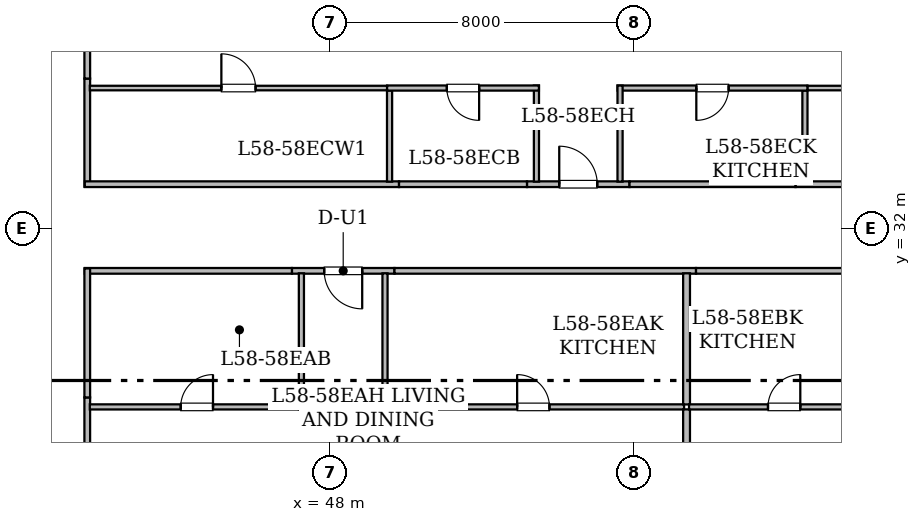
"""IFC4 building model, lengths in metres.
Left out: names, types, materials, properties, quantities, classifications, styles, units other than length and angle.
Written with IfcOpenShell. Run it as: python <this file> out.ifc"""

import sys

from ifc_helpers import new_model, si_unit, direction, frame, frame_2d, origin, place, context, subcontext, project, spatial, rectangle, extrude, element, fill, save


model = new_model("IFC4")
c1 = context("Model", 3, precision=1e-05, world=origin(), true_north=direction((0.0, 1.0)))
c2 = subcontext(c1, "Body", "Model", "MODEL_VIEW")
j1 = project(units=[si_unit("LENGTHUNIT", "METRE"), si_unit("PLANEANGLEUNIT", "RADIAN")], contexts=[c1])
p1 = place(None, origin())
s1 = spatial("IfcSite", under=j1, at=p1, CompositionType="ELEMENT")
p2 = place(p1, origin())
s2 = spatial("IfcBuilding", under=s1, at=p2, CompositionType="ELEMENT")
p3 = place(p2, frame((0.0, 0.0, 228.15)))
s3 = spatial("IfcBuildingStorey", under=s2, at=p3, CompositionType="ELEMENT", Elevation=228.15)
p4 = place(p3, frame((49.699, 30.885, 0.0), z_axis=(0.0, 0.0, 1.0), x_axis=(-1.0, 0.0, 0.0)))
e1 = element("IfcWall", 1, at=p4, inside=s3, PredefinedType="STANDARD", context=c2, shape_type="SweptSolid", body=[
    extrude(rectangle(XDim=2.698, YDim=0.15, at=frame_2d((1.349, 0.0))), origin(), (0.0, 0.0, 1.0), 3.43),
])
p5 = place(p4, frame((0.849, 0.0, 0.0)))
e2 = element("IfcOpeningElement", 2, at=p5, cuts=e1, PredefinedType="OPENING", context=c2, shape_type="SweptSolid", body=[
    extrude(rectangle(XDim=1.0, YDim=2.15, at=frame_2d((0.5, 1.075))), frame((0.0, 0.085, 0.0), z_axis=(0.0, -1.0, 0.0), x_axis=(1.0, 0.0, 0.0)), (0.0, 0.0, 1.0), 0.17),
])
p6 = place(p3, frame((41.615, 27.554, 0.0), z_axis=(0.0, 0.0, 1.0), x_axis=(0.0, -1.0, 0.0)))
e3 = element("IfcWall", 3, at=p6, inside=s3, PredefinedType="STANDARD", context=c2, shape_type="SweptSolid", body=[
    extrude(rectangle(XDim=2.078, YDim=0.15, at=frame_2d((1.039, 0.0))), origin(), (0.0, 0.0, 1.0), 3.43),
])
p7 = place(p3, frame((47.001, 30.885, 0.0), z_axis=(0.0, 0.0, 1.0), x_axis=(-1.0, 0.0, 0.0)))
e4 = element("IfcWall", 4, at=p7, inside=s3, PredefinedType="STANDARD", context=c2, shape_type="SweptSolid", body=[
    extrude(rectangle(XDim=5.451, YDim=0.15, at=frame_2d((2.726, 0.0))), origin(), (0.0, 0.0, 1.0), 3.43),
])
p8 = place(p3, frame((41.615, 30.948, 0.0), z_axis=(0.0, 0.0, 1.0), x_axis=(0.0, -1.0, 0.0)))
e5 = element("IfcWall", 5, at=p8, inside=s3, PredefinedType="STANDARD", context=c2, shape_type="SweptSolid", body=[
    extrude(rectangle(XDim=3.394, YDim=0.15, at=frame_2d((1.697, 0.0))), origin(), (0.0, 0.0, 1.0), 3.43),
])
p9 = place(p3, frame((57.634, 30.885, 0.0), z_axis=(0.0, 0.0, 1.0), x_axis=(-1.0, 0.0, 0.0)))
e6 = element("IfcWall", 6, at=p9, inside=s3, PredefinedType="STANDARD", context=c2, shape_type="SweptSolid", body=[
    extrude(rectangle(XDim=7.935, YDim=0.15, at=frame_2d((3.968, 0.0))), origin(), (0.0, 0.0, 1.0), 2.725),
])
p10 = place(p3, frame((62.142, 30.885, 0.0), z_axis=(0.0, 0.0, 1.0), x_axis=(-1.0, 0.0, 0.0)))
e7 = element("IfcWall", 7, at=p10, inside=s3, PredefinedType="STANDARD", context=c2, shape_type="SweptSolid", body=[
    extrude(rectangle(XDim=4.508, YDim=0.15, at=frame_2d((2.254, 0.0))), origin(), (0.0, 0.0, 1.0), 3.43),
])
p11 = place(p3, frame((41.615, 35.944, 0.0), z_axis=(0.0, 0.0, 1.0), x_axis=(0.0, -1.0, 0.0)))
e8 = element("IfcWall", 8, at=p11, inside=s3, PredefinedType="STANDARD", context=c2, shape_type="SweptSolid", body=[
    extrude(rectangle(XDim=2.844, YDim=0.15, at=frame_2d((1.422, 0.0))), origin(), (0.0, 0.0, 1.0), 3.065),
])
p12 = place(p3, frame((41.55, 33.165, 0.0), z_axis=(0.0, 0.0, 1.0), x_axis=(1.0, 0.0, 0.0)))
e9 = element("IfcWall", 9, at=p12, inside=s3, PredefinedType="STANDARD", context=c2, shape_type="SweptSolid", body=[
    extrude(rectangle(XDim=8.269, YDim=0.15, at=frame_2d((4.135, 0.0))), origin(), (0.0, 0.0, 1.0), 3.065),
])
p13 = place(p3, frame((60.251, 33.165, 0.0), z_axis=(0.0, 0.0, 1.0), x_axis=(1.0, 0.0, 0.0)))
e10 = element("IfcWall", 10, at=p13, inside=s3, PredefinedType="STANDARD", context=c2, shape_type="SweptSolid", body=[
    extrude(rectangle(XDim=9.357, YDim=0.15, at=frame_2d((4.678, 0.0))), origin(), (0.0, 0.0, 1.0), 2.887),
])
p14 = place(p3, frame((41.615, 37.524, 0.0), z_axis=(0.0, 0.0, 1.0), x_axis=(0.0, -1.0, 0.0)))
e11 = element("IfcWall", 11, at=p14, inside=s3, PredefinedType="STANDARD", context=c2, shape_type="SweptSolid", body=[
    extrude(rectangle(XDim=1.58, YDim=0.15, at=frame_2d((0.79, 0.0))), origin(), (0.0, 0.0, 1.0), 2.725),
])
p15 = place(p3, frame((53.186, 33.165, 0.0), z_axis=(0.0, 0.0, 1.0), x_axis=(1.0, 0.0, 0.0)))
e12 = element("IfcWall", 12, at=p15, inside=s3, PredefinedType="STANDARD", context=c2, shape_type="SweptSolid", body=[
    extrude(rectangle(XDim=2.698, YDim=0.15, at=frame_2d((1.349, 0.0))), origin(), (0.0, 0.0, 1.0), 2.725),
])
p16 = place(p15, frame((0.849, 0.0, 0.0)))
e13 = element("IfcOpeningElement", 13, at=p16, cuts=e12, PredefinedType="OPENING", context=c2, shape_type="SweptSolid", body=[
    extrude(rectangle(XDim=1.0, YDim=2.15, at=frame_2d((0.5, 1.075))), frame((0.0, 0.085, 0.0), z_axis=(0.0, -1.0, 0.0), x_axis=(1.0, 0.0, 0.0)), (0.0, 0.0, 1.0), 0.17),
])
p17 = place(p3, frame((49.819, 33.165, 0.0), z_axis=(0.0, 0.0, 1.0), x_axis=(1.0, 0.0, 0.0)))
e14 = element("IfcWall", 14, at=p17, inside=s3, PredefinedType="STANDARD", context=c2, shape_type="SweptSolid", body=[
    extrude(rectangle(XDim=3.367, YDim=0.15, at=frame_2d((1.684, 0.0))), origin(), (0.0, 0.0, 1.0), 2.725),
])
p18 = place(p3, frame((55.884, 33.165, 0.0), z_axis=(0.0, 0.0, 1.0), x_axis=(1.0, 0.0, 0.0)))
e15 = element("IfcWall", 15, at=p18, inside=s3, PredefinedType="STANDARD", context=c2, shape_type="SweptSolid", body=[
    extrude(rectangle(XDim=4.367, YDim=0.15, at=frame_2d((2.184, 0.0))), origin(), (0.0, 0.0, 1.0), 3.065),
])
p19 = place(p3, frame((41.682, 27.305, 0.0), z_axis=(0.0, 0.0, 1.0), x_axis=(1.0, 0.0, 0.0)))
e16 = element("IfcWall", 16, at=p19, inside=s3, PredefinedType="PARTITIONING", context=c2, shape_type="SweptSolid", body=[
    extrude(rectangle(XDim=5.633, YDim=0.135, at=frame_2d((2.816, 0.0))), origin(), (0.0, 0.0, 1.0), 3.43),
])
p20 = place(p19, frame((2.392, 0.0, 0.0)))
e17 = element("IfcOpeningElement", 17, at=p20, cuts=e16, PredefinedType="OPENING", context=c2, shape_type="SweptSolid", body=[
    extrude(rectangle(XDim=0.85, YDim=2.1, at=frame_2d((0.425, 1.05))), frame((0.0, 0.077, 0.0), z_axis=(0.0, -1.0, 0.0), x_axis=(1.0, 0.0, 0.0)), (0.0, 0.0, 1.0), 0.155),
])
for number, where, z_axis, x_axis in (
    (18, (47.25, 27.24, 0.0), (0.0, 0.0, 1.0), (0.0, 1.0, 0.0)),
    (19, (49.45, 30.82, 0.0), (0.0, 0.0, 1.0), (0.0, -1.0, 0.0)),
):
    element("IfcWall", number, at=place(p3, frame(where, z_axis=z_axis, x_axis=x_axis)), inside=s3, PredefinedType="PARTITIONING", context=c2, shape_type="SweptSolid", body=[
        extrude(rectangle(XDim=3.58, YDim=0.135, at=frame_2d((1.79, 0.0))), origin(), (0.0, 0.0, 1.0), 3.43),
    ])
p21 = place(p3, frame((49.385, 27.305, 0.0), z_axis=(0.0, 0.0, 1.0), x_axis=(1.0, 0.0, 0.0)))
e20 = element("IfcWall", 20, at=p21, inside=s3, PredefinedType="PARTITIONING", context=c2, shape_type="SweptSolid", body=[
    extrude(rectangle(XDim=7.935, YDim=0.135, at=frame_2d((3.968, 0.0))), origin(), (0.0, 0.0, 1.0), 2.725),
])
p22 = place(p21, frame((3.542, 0.0, 0.0)))
e21 = element("IfcOpeningElement", 21, at=p22, cuts=e20, PredefinedType="OPENING", context=c2, shape_type="SweptSolid", body=[
    extrude(rectangle(XDim=0.85, YDim=2.1, at=frame_2d((0.425, 1.05))), frame((0.0, 0.077, 0.0), z_axis=(0.0, -1.0, 0.0), x_axis=(1.0, 0.0, 0.0)), (0.0, 0.0, 1.0), 0.155),
])
p23 = place(p3, frame((57.385, 27.24, 0.0), z_axis=(0.0, 0.0, 1.0), x_axis=(0.0, -1.0, 0.0)))
e22 = element("IfcWall", 22, at=p23, inside=s3, PredefinedType="STANDARD", context=c2, shape_type="SweptSolid", body=[
    extrude(rectangle(XDim=1.45, YDim=0.18, at=frame_2d((0.725, 0.0))), origin(), (0.0, 0.0, 1.0), 3.43),
])
p24 = place(p3, frame((57.385, 30.82, 0.0), z_axis=(0.0, 0.0, 1.0), x_axis=(0.0, -1.0, 0.0)))
e23 = element("IfcWall", 23, at=p24, inside=s3, PredefinedType="STANDARD", context=c2, shape_type="SweptSolid", body=[
    extrude(rectangle(XDim=3.45, YDim=0.18, at=frame_2d((1.725, 0.0))), origin(), (0.0, 0.0, 1.0), 3.43),
])
p25 = place(p3, frame((57.45, 27.305, 0.0), z_axis=(0.0, 0.0, 1.0), x_axis=(1.0, 0.0, 0.0)))
e24 = element("IfcWall", 24, at=p25, inside=s3, PredefinedType="PARTITIONING", context=c2, shape_type="SweptSolid", body=[
    extrude(rectangle(XDim=5.006, YDim=0.135, at=frame_2d((2.503, 0.0))), origin(), (0.0, 0.0, 1.0), 3.43),
])
p26 = place(p25, frame((2.078, 0.0, 0.0)))
e25 = element("IfcOpeningElement", 25, at=p26, cuts=e24, PredefinedType="OPENING", context=c2, shape_type="SweptSolid", body=[
    extrude(rectangle(XDim=0.85, YDim=2.1, at=frame_2d((0.425, 1.05))), frame((0.0, 0.077, 0.0), z_axis=(0.0, -1.0, 0.0), x_axis=(1.0, 0.0, 0.0)), (0.0, 0.0, 1.0), 0.155),
])
p27 = place(p3, frame((41.682, 35.695, 0.0), z_axis=(0.0, 0.0, 1.0), x_axis=(1.0, 0.0, 0.0)))
e26 = element("IfcWall", 26, at=p27, inside=s3, PredefinedType="PARTITIONING", context=c2, shape_type="SweptSolid", body=[
    extrude(rectangle(XDim=7.823, YDim=0.12, at=frame_2d((3.912, 0.0))), origin(), (0.0, 0.0, 1.0), 3.43),
])
p28 = place(p27, frame((3.462, 0.0, 0.0)))
e27 = element("IfcOpeningElement", 27, at=p28, cuts=e26, PredefinedType="OPENING", context=c2, shape_type="SweptSolid", body=[
    extrude(rectangle(XDim=0.9, YDim=2.1, at=frame_2d((0.45, 1.05))), frame((0.0, 0.07, 0.0), z_axis=(0.0, -1.0, 0.0), x_axis=(1.0, 0.0, 0.0)), (0.0, 0.0, 1.0), 0.14),
])
p29 = place(p3, frame((49.57, 35.63, 0.0), z_axis=(0.0, 0.0, 1.0), x_axis=(0.0, -1.0, 0.0)))
e28 = element("IfcWall", 28, at=p29, inside=s3, PredefinedType="PARTITIONING", context=c2, shape_type="SweptSolid", body=[
    extrude(rectangle(XDim=2.398, YDim=0.135, at=frame_2d((1.199, 0.0))), origin(), (0.0, 0.0, 1.0), 3.065),
])
p30 = place(p3, frame((60.565, 35.695, 0.0), z_axis=(0.0, 0.0, 1.0), x_axis=(1.0, 0.0, 0.0)))
e29 = element("IfcWall", 29, at=p30, inside=s3, PredefinedType="PARTITIONING", context=c2, shape_type="SweptSolid", body=[
    extrude(rectangle(XDim=9.043, YDim=0.12, at=frame_2d((4.521, 0.0))), origin(), (0.0, 0.0, 1.0), 2.725),
])
p31 = place(p30, frame((4.071, 0.0, 0.0)))
e30 = element("IfcOpeningElement", 30, at=p31, cuts=e29, PredefinedType="OPENING", context=c2, shape_type="SweptSolid", body=[
    extrude(rectangle(XDim=0.9, YDim=2.1, at=frame_2d((0.45, 1.05))), frame((0.0, 0.07, 0.0), z_axis=(0.0, -1.0, 0.0), x_axis=(1.0, 0.0, 0.0)), (0.0, 0.0, 1.0), 0.14),
])
p32 = place(p3, frame((60.5, 33.232, 0.0), z_axis=(0.0, 0.0, 1.0), x_axis=(0.0, 1.0, 0.0)))
e31 = element("IfcWall", 31, at=p32, inside=s3, PredefinedType="PARTITIONING", context=c2, shape_type="SweptSolid", body=[
    extrude(rectangle(XDim=2.398, YDim=0.135, at=frame_2d((1.199, 0.0))), origin(), (0.0, 0.0, 1.0), 3.065),
])
p33 = place(p3, frame((53.435, 33.232, 0.0), z_axis=(0.0, 0.0, 1.0), x_axis=(0.0, 1.0, 0.0)))
e32 = element("IfcWall", 32, at=p33, inside=s3, PredefinedType="PARTITIONING", context=c2, shape_type="SweptSolid", body=[
    extrude(rectangle(XDim=2.528, YDim=0.135, at=frame_2d((1.264, 0.0))), origin(), (0.0, 0.0, 1.0), 2.725),
])
p34 = place(p3, frame((53.5, 35.695, 0.0), z_axis=(0.0, 0.0, 1.0), x_axis=(-1.0, 0.0, 0.0)))
e33 = element("IfcWall", 33, at=p34, inside=s3, PredefinedType="PARTITIONING", context=c2, shape_type="SweptSolid", body=[
    extrude(rectangle(XDim=3.995, YDim=0.135, at=frame_2d((1.998, 0.0))), origin(), (0.0, 0.0, 1.0), 2.725),
])
p35 = place(p34, frame((1.573, 0.0, 0.0)))
e34 = element("IfcOpeningElement", 34, at=p35, cuts=e33, PredefinedType="OPENING", context=c2, shape_type="SweptSolid", body=[
    extrude(rectangle(XDim=0.85, YDim=2.1, at=frame_2d((0.425, 1.05))), frame((0.0, 0.077, 0.0), z_axis=(0.0, -1.0, 0.0), x_axis=(1.0, 0.0, 0.0)), (0.0, 0.0, 1.0), 0.155),
])
p36 = place(p3, frame((60.565, 35.695, 0.0), z_axis=(0.0, 0.0, 1.0), x_axis=(-1.0, 0.0, 0.0)))
e35 = element("IfcWall", 35, at=p36, inside=s3, PredefinedType="PARTITIONING", context=c2, shape_type="SweptSolid", body=[
    extrude(rectangle(XDim=4.995, YDim=0.135, at=frame_2d((2.498, 0.0))), origin(), (0.0, 0.0, 1.0), 3.43),
])
p37 = place(p36, frame((2.073, 0.0, 0.0)))
e36 = element("IfcOpeningElement", 36, at=p37, cuts=e35, PredefinedType="OPENING", context=c2, shape_type="SweptSolid", body=[
    extrude(rectangle(XDim=0.85, YDim=2.1, at=frame_2d((0.425, 1.05))), frame((0.0, 0.077, 0.0), z_axis=(0.0, -1.0, 0.0), x_axis=(1.0, 0.0, 0.0)), (0.0, 0.0, 1.0), 0.155),
])
p38 = place(p3, frame((55.635, 35.76, 0.0), z_axis=(0.0, 0.0, 1.0), x_axis=(0.0, -1.0, 0.0)))
e37 = element("IfcWall", 37, at=p38, inside=s3, PredefinedType="PARTITIONING", context=c2, shape_type="SweptSolid", body=[
    extrude(rectangle(XDim=2.528, YDim=0.135, at=frame_2d((1.264, 0.0))), origin(), (0.0, 0.0, 1.0), 3.065),
])
p39 = place(p5, origin())
e38 = element("IfcDoor", 38, at=p39, inside=s3, OperationType="SINGLE_SWING_LEFT", PredefinedType="DOOR", context=c2, shape_type="SweptSolid", body=[
    extrude(rectangle(XDim=1.0, YDim=2.15, at=frame_2d((0.5, 1.075))), frame((0.0, 0.025, 0.0), z_axis=(0.0, -1.0, 0.0), x_axis=(1.0, 0.0, 0.0)), (0.0, 0.0, 1.0), 0.05),
])
fill(e2, e38)
p40 = place(p16, origin())
e39 = element("IfcDoor", 39, at=p40, inside=s3, OperationType="SINGLE_SWING_LEFT", PredefinedType="DOOR", context=c2, shape_type="SweptSolid", body=[
    extrude(rectangle(XDim=1.0, YDim=2.15, at=frame_2d((0.5, 1.075))), frame((0.0, 0.025, 0.0), z_axis=(0.0, -1.0, 0.0), x_axis=(1.0, 0.0, 0.0)), (0.0, 0.0, 1.0), 0.05),
])
fill(e13, e39)
p41 = place(p20, origin())
e40 = element("IfcDoor", 40, at=p41, inside=s3, OperationType="SINGLE_SWING_RIGHT", PredefinedType="DOOR", context=c2, shape_type="SweptSolid", body=[
    extrude(rectangle(XDim=0.85, YDim=2.1, at=frame_2d((0.425, 1.05))), frame((0.0, 0.025, 0.0), z_axis=(0.0, -1.0, 0.0), x_axis=(1.0, 0.0, 0.0)), (0.0, 0.0, 1.0), 0.05),
])
fill(e17, e40)
p42 = place(p22, origin())
e41 = element("IfcDoor", 41, at=p42, inside=s3, OperationType="SINGLE_SWING_LEFT", PredefinedType="DOOR", context=c2, shape_type="SweptSolid", body=[
    extrude(rectangle(XDim=0.85, YDim=2.1, at=frame_2d((0.425, 1.05))), frame((0.0, 0.025, 0.0), z_axis=(0.0, -1.0, 0.0), x_axis=(1.0, 0.0, 0.0)), (0.0, 0.0, 1.0), 0.05),
])
fill(e21, e41)
p43 = place(p26, origin())
e42 = element("IfcDoor", 42, at=p43, inside=s3, OperationType="SINGLE_SWING_RIGHT", PredefinedType="DOOR", context=c2, shape_type="SweptSolid", body=[
    extrude(rectangle(XDim=0.85, YDim=2.1, at=frame_2d((0.425, 1.05))), frame((0.0, 0.025, 0.0), z_axis=(0.0, -1.0, 0.0), x_axis=(1.0, 0.0, 0.0)), (0.0, 0.0, 1.0), 0.05),
])
fill(e25, e42)
p44 = place(p28, origin())
e43 = element("IfcDoor", 43, at=p44, inside=s3, OperationType="SINGLE_SWING_LEFT", PredefinedType="DOOR", context=c2, shape_type="SweptSolid", body=[
    extrude(rectangle(XDim=0.9, YDim=2.1, at=frame_2d((0.45, 1.05))), frame((0.0, 0.025, 0.0), z_axis=(0.0, -1.0, 0.0), x_axis=(1.0, 0.0, 0.0)), (0.0, 0.0, 1.0), 0.05),
])
fill(e27, e43)
p45 = place(p35, origin())
e44 = element("IfcDoor", 44, at=p45, inside=s3, OperationType="SINGLE_SWING_LEFT", PredefinedType="DOOR", context=c2, shape_type="SweptSolid", body=[
    extrude(rectangle(XDim=0.85, YDim=2.1, at=frame_2d((0.425, 1.05))), frame((0.0, 0.025, 0.0), z_axis=(0.0, -1.0, 0.0), x_axis=(1.0, 0.0, 0.0)), (0.0, 0.0, 1.0), 0.05),
])
fill(e34, e44)
p46 = place(p37, origin())
e45 = element("IfcDoor", 45, at=p46, inside=s3, OperationType="SINGLE_SWING_RIGHT", PredefinedType="DOOR", context=c2, shape_type="SweptSolid", body=[
    extrude(rectangle(XDim=0.85, YDim=2.1, at=frame_2d((0.425, 1.05))), frame((0.0, 0.025, 0.0), z_axis=(0.0, -1.0, 0.0), x_axis=(1.0, 0.0, 0.0)), (0.0, 0.0, 1.0), 0.05),
])
fill(e36, e45)
save(model, sys.argv[1])
